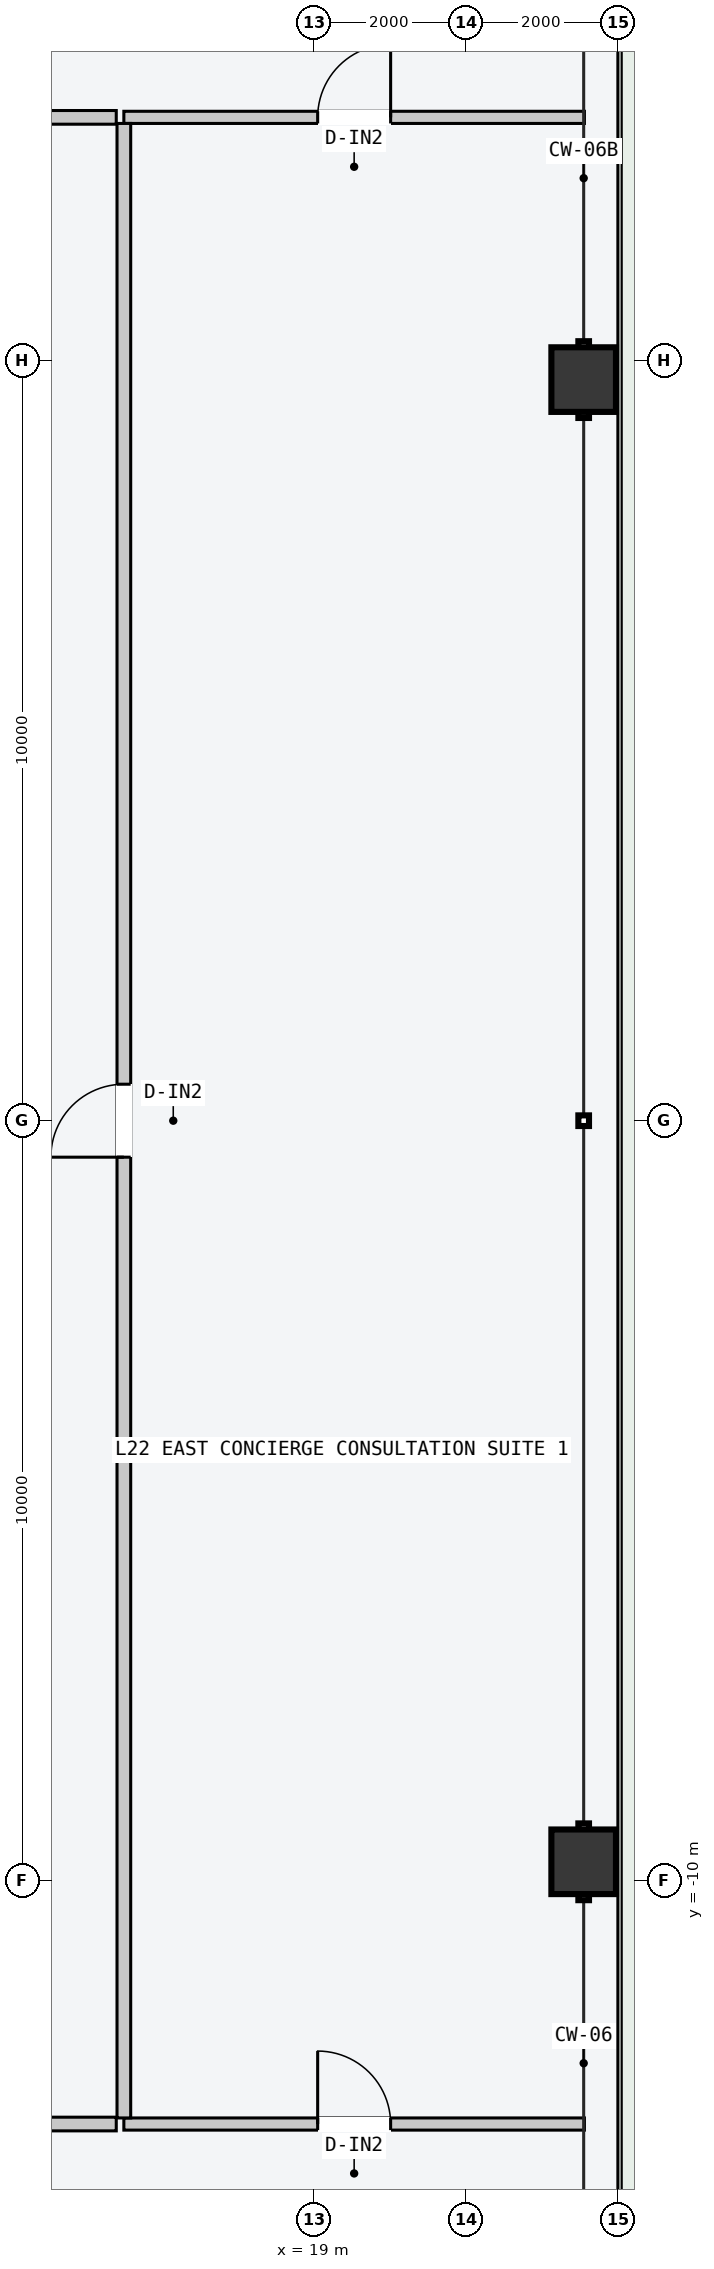
"""IFC4 building model, lengths in metres.
Left out: names, types, materials, properties, quantities, classifications, styles, units other than length and angle.
Written with IfcOpenShell. Run it as: python <this file> out.ifc"""

import sys

from ifc_helpers import new_model, si_unit, direction, frame, frame_2d, origin, origin_2d, place, context, subcontext, project, spatial, rectangle, hollow_rectangle, extrude, element, fill, save


model = new_model("IFC4")
c1 = context("Model", 3, precision=1e-05, world=origin(), true_north=direction((0.0, 1.0)))
c2 = subcontext(c1, "Body", "Model", "MODEL_VIEW")
j1 = project(units=[si_unit("LENGTHUNIT", "METRE"), si_unit("PLANEANGLEUNIT", "RADIAN")], contexts=[c1])
p1 = place(None, origin())
s1 = spatial("IfcSite", under=j1, at=p1, CompositionType="ELEMENT")
p2 = place(p1, origin())
s2 = spatial("IfcBuilding", under=s1, at=p2, CompositionType="ELEMENT")
p3 = place(p2, frame((0.0, 0.0, 87.3)))
s3 = spatial("IfcBuildingStorey", under=s2, at=p3, CompositionType="ELEMENT", Elevation=87.3)
for number, where, z_axis, x_axis in (
    (1, (22.55, -9.75, -0.2), (0.0, 0.0, 1.0), (0.0, 1.0, 0.0)),
    (2, (22.55, 9.75, -0.2), (0.0, 0.0, 1.0), (0.0, 1.0, 0.0)),
):
    element("IfcColumn", number, at=place(p3, frame(where, z_axis=z_axis, x_axis=x_axis)), inside=s3, PredefinedType="COLUMN", context=c2, shape_type="SweptSolid", body=[
        extrude(hollow_rectangle(XDim=0.85, YDim=0.85, WallThickness=0.04, at=origin_2d()), origin(), (0.0, 0.0, 1.0), 4.7),
    ])
p4 = place(p3, frame((-16.4, 13.2, 0.0), z_axis=(0.0, 0.0, 1.0), x_axis=(1.0, 0.0, 0.0)))
e3 = element("IfcWall", 3, at=p4, inside=s3, PredefinedType="PARTITIONING", context=c2, shape_type="SweptSolid", body=[
    extrude(rectangle(XDim=32.8, YDim=0.18, at=frame_2d((16.4, 0.0))), origin(), (0.0, 0.0, 1.0), 4.3),
])
p5 = place(p4, frame((5.044, 0.0, 0.0)))
e4 = element("IfcOpeningElement", 4, at=p5, cuts=e3, PredefinedType="OPENING", context=c2, shape_type="SweptSolid", body=[
    extrude(rectangle(XDim=0.9, YDim=2.15, at=frame_2d((0.45, 1.075))), frame((0.0, 0.1, 0.0), z_axis=(0.0, -1.0, 0.0), x_axis=(1.0, 0.0, 0.0)), (0.0, 0.0, 1.0), 0.2),
])
p6 = place(p4, frame((21.414, 0.0, 0.0)))
e5 = element("IfcOpeningElement", 5, at=p6, cuts=e3, PredefinedType="OPENING", context=c2, shape_type="SweptSolid", body=[
    extrude(rectangle(XDim=0.96, YDim=2.18, at=frame_2d((0.48, 1.09))), frame((0.0, 0.1, 0.0), z_axis=(0.0, -1.0, 0.0), x_axis=(1.0, 0.0, 0.0)), (0.0, 0.0, 1.0), 0.2),
])
p7 = place(p3, frame((16.5, 13.2, 0.0), z_axis=(0.0, 0.0, 1.0), x_axis=(1.0, 0.0, 0.0)))
e6 = element("IfcWall", 6, at=p7, inside=s3, PredefinedType="PARTITIONING", context=c2, shape_type="SweptSolid", body=[
    extrude(rectangle(XDim=6.06, YDim=0.16, at=frame_2d((3.03, 0.0))), origin(), (0.0, 0.0, 1.0), 4.3),
])
p8 = place(p7, frame((2.55, 0.0, 0.0)))
e7 = element("IfcOpeningElement", 7, at=p8, cuts=e6, PredefinedType="OPENING", context=c2, shape_type="SweptSolid", body=[
    extrude(rectangle(XDim=0.96, YDim=2.18, at=frame_2d((0.48, 1.09))), frame((0.0, 0.09, 0.0), z_axis=(0.0, -1.0, 0.0), x_axis=(1.0, 0.0, 0.0)), (0.0, 0.0, 1.0), 0.18),
])
p9 = place(p3, frame((-16.4, -13.2, 0.0), z_axis=(0.0, 0.0, 1.0), x_axis=(1.0, 0.0, 0.0)))
e8 = element("IfcWall", 8, at=p9, inside=s3, PredefinedType="PARTITIONING", context=c2, shape_type="SweptSolid", body=[
    extrude(rectangle(XDim=32.8, YDim=0.18, at=frame_2d((16.4, 0.0))), origin(), (0.0, 0.0, 1.0), 4.3),
])
p10 = place(p9, frame((10.037, 0.0, 0.0)))
e9 = element("IfcOpeningElement", 9, at=p10, cuts=e8, PredefinedType="OPENING", context=c2, shape_type="SweptSolid", body=[
    extrude(rectangle(XDim=1.06, YDim=2.2, at=frame_2d((0.53, 1.1))), frame((0.0, 0.1, 0.0), z_axis=(0.0, -1.0, 0.0), x_axis=(1.0, 0.0, 0.0)), (0.0, 0.0, 1.0), 0.2),
])
p11 = place(p9, frame((26.347, 0.0, 0.0)))
e10 = element("IfcOpeningElement", 10, at=p11, cuts=e8, PredefinedType="OPENING", context=c2, shape_type="SweptSolid", body=[
    extrude(rectangle(XDim=1.24, YDim=2.24, at=frame_2d((0.62, 1.12))), frame((0.0, 0.1, 0.0), z_axis=(0.0, -1.0, 0.0), x_axis=(1.0, 0.0, 0.0)), (0.0, 0.0, 1.0), 0.2),
])
p12 = place(p3, frame((16.5, -13.2, 0.0), z_axis=(0.0, 0.0, 1.0), x_axis=(1.0, 0.0, 0.0)))
e11 = element("IfcWall", 11, at=p12, inside=s3, PredefinedType="PARTITIONING", context=c2, shape_type="SweptSolid", body=[
    extrude(rectangle(XDim=6.06, YDim=0.16, at=frame_2d((3.03, 0.0))), origin(), (0.0, 0.0, 1.0), 4.3),
])
p13 = place(p12, frame((2.55, 0.0, 0.0)))
e12 = element("IfcOpeningElement", 12, at=p13, cuts=e11, PredefinedType="OPENING", context=c2, shape_type="SweptSolid", body=[
    extrude(rectangle(XDim=0.96, YDim=2.18, at=frame_2d((0.48, 1.09))), frame((0.0, 0.09, 0.0), z_axis=(0.0, -1.0, 0.0), x_axis=(1.0, 0.0, 0.0)), (0.0, 0.0, 1.0), 0.18),
])
p14 = place(p3, frame((16.5, -13.12, 0.0), z_axis=(0.0, 0.0, 1.0), x_axis=(0.0, 1.0, 0.0)))
e13 = element("IfcWall", 13, at=p14, inside=s3, PredefinedType="PARTITIONING", context=c2, shape_type="SweptSolid", body=[
    extrude(rectangle(XDim=26.24, YDim=0.18, at=frame_2d((13.12, 0.0))), origin(), (0.0, 0.0, 1.0), 4.3),
])
p15 = place(p14, frame((12.64, 0.0, 0.0)))
e14 = element("IfcOpeningElement", 14, at=p15, cuts=e13, PredefinedType="OPENING", context=c2, shape_type="SweptSolid", body=[
    extrude(rectangle(XDim=0.96, YDim=2.18, at=frame_2d((0.48, 1.09))), frame((0.0, 0.1, 0.0), z_axis=(0.0, -1.0, 0.0), x_axis=(1.0, 0.0, 0.0)), (0.0, 0.0, 1.0), 0.2),
])
p16 = place(p8, origin())
e15 = element("IfcDoor", 15, at=p16, inside=s3, OperationType="SINGLE_SWING_RIGHT", PredefinedType="DOOR", context=c2, shape_type="SweptSolid", body=[
    extrude(rectangle(XDim=0.96, YDim=2.18, at=frame_2d((0.48, 1.09))), frame((0.0, 0.025, 0.0), z_axis=(0.0, -1.0, 0.0), x_axis=(1.0, 0.0, 0.0)), (0.0, 0.0, 1.0), 0.05),
])
fill(e7, e15)
p17 = place(p13, origin())
e16 = element("IfcDoor", 16, at=p17, inside=s3, OperationType="SINGLE_SWING_LEFT", PredefinedType="DOOR", context=c2, shape_type="SweptSolid", body=[
    extrude(rectangle(XDim=0.96, YDim=2.18, at=frame_2d((0.48, 1.09))), frame((0.0, 0.025, 0.0), z_axis=(0.0, -1.0, 0.0), x_axis=(1.0, 0.0, 0.0)), (0.0, 0.0, 1.0), 0.05),
])
fill(e12, e16)
p18 = place(p15, origin())
e17 = element("IfcDoor", 17, at=p18, inside=s3, OperationType="SINGLE_SWING_LEFT", PredefinedType="DOOR", context=c2, shape_type="SweptSolid", body=[
    extrude(rectangle(XDim=0.96, YDim=2.18, at=frame_2d((0.48, 1.09))), frame((0.0, 0.025, 0.0), z_axis=(0.0, -1.0, 0.0), x_axis=(1.0, 0.0, 0.0)), (0.0, 0.0, 1.0), 0.05),
])
fill(e14, e17)
save(model, sys.argv[1])
